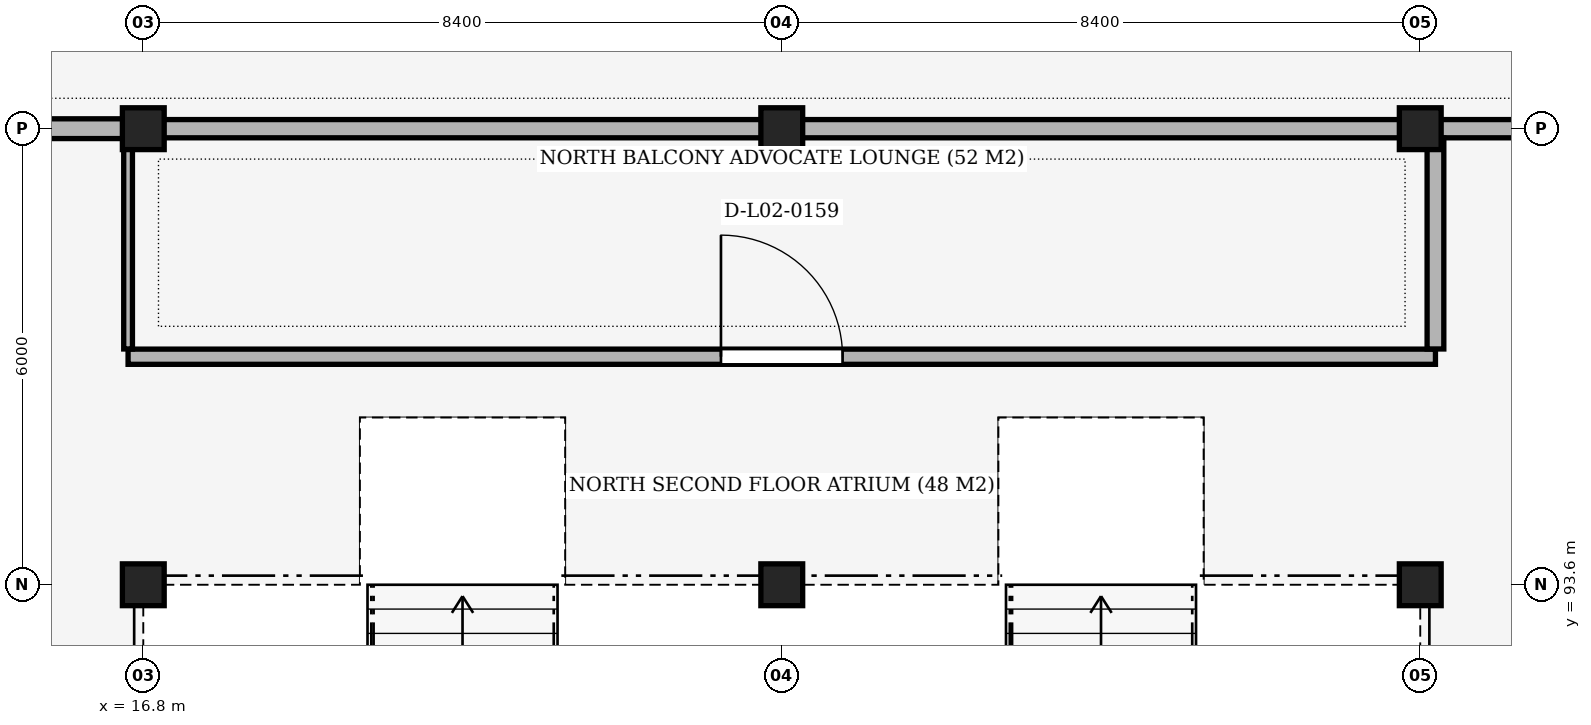
"""IFC4 building model, lengths in metres.
Left out: names, types, materials, properties, quantities, classifications, styles, units other than length and angle.
Written with IfcOpenShell. Run it as: python <this file> out.ifc"""

import sys

from ifc_helpers import new_model, si_unit, direction, frame, frame_2d, origin, origin_2d, place, context, subcontext, project, spatial, rectangle, extrude, element, fill, save


model = new_model("IFC4")
c1 = context("Model", 3, precision=1e-05, world=origin(), true_north=direction((0.0, 1.0)))
c2 = subcontext(c1, "Body", "Model", "MODEL_VIEW")
j1 = project(units=[si_unit("LENGTHUNIT", "METRE"), si_unit("PLANEANGLEUNIT", "RADIAN")], contexts=[c1])
p1 = place(None, origin())
s1 = spatial("IfcSite", under=j1, at=p1, CompositionType="ELEMENT")
p2 = place(p1, origin())
s2 = spatial("IfcBuilding", under=s1, at=p2, CompositionType="ELEMENT")
p3 = place(p2, frame((0.0, 0.0, 10.2)))
s3 = spatial("IfcBuildingStorey", under=s2, at=p3, CompositionType="ELEMENT", Elevation=10.2)
for number, where, z_axis, x_axis in (
    (1, (16.8, 93.6, 0.0), (0.0, 0.0, 1.0), (1.0, 0.0, 0.0)),
    (2, (16.8, 99.6, 0.0), (0.0, 0.0, 1.0), (1.0, 0.0, 0.0)),
    (3, (25.2, 93.6, 0.0), (0.0, 0.0, 1.0), (1.0, 0.0, 0.0)),
    (4, (25.2, 99.6, 0.0), (0.0, 0.0, 1.0), (1.0, 0.0, 0.0)),
    (5, (33.6, 93.6, 0.0), (0.0, 0.0, 1.0), (1.0, 0.0, 0.0)),
    (6, (33.6, 99.6, 0.0), (0.0, 0.0, 1.0), (1.0, 0.0, 0.0)),
):
    element("IfcColumn", number, at=place(p3, frame(where, z_axis=z_axis, x_axis=x_axis)), inside=s3, PredefinedType="COLUMN", context=c2, shape_type="SweptSolid", body=[
        extrude(rectangle(XDim=0.55, YDim=0.55, at=origin_2d()), origin(), (0.0, 0.0, 1.0), 5.1),
    ])
p4 = place(p3, frame((16.6, 96.6, 0.0), z_axis=(0.0, 0.0, 1.0), x_axis=(1.0, 0.0, 0.0)))
e7 = element("IfcWall", 7, at=p4, inside=s3, PredefinedType="PARTITIONING", context=c2, shape_type="SweptSolid", body=[
    extrude(rectangle(XDim=17.2, YDim=0.2, at=frame_2d((8.6, 0.0))), origin(), (0.0, 0.0, 1.0), 4.27),
])
p5 = place(p4, frame((7.8, 0.0, 0.0)))
e8 = element("IfcOpeningElement", 8, at=p5, cuts=e7, PredefinedType="OPENING", context=c2, shape_type="SweptSolid", body=[
    extrude(rectangle(XDim=1.6, YDim=2.3, at=frame_2d((0.8, 1.15))), frame((0.0, 0.115, 0.0), z_axis=(0.0, -1.0, 0.0), x_axis=(1.0, 0.0, 0.0)), (0.0, 0.0, 1.0), 0.23),
])
p6 = place(p3, frame((13.8, 99.6, 0.0), z_axis=(0.0, 0.0, 1.0), x_axis=(1.0, 0.0, 0.0)))
e9 = element("IfcWall", 9, at=p6, inside=s3, PredefinedType="PARTITIONING", context=c2, shape_type="SweptSolid", body=[
    extrude(rectangle(XDim=2.8, YDim=0.26, at=frame_2d((1.4, 0.0))), origin(), (0.0, 0.0, 1.0), 4.12),
])
p7 = place(p3, frame((33.8, 99.6, 0.0), z_axis=(0.0, 0.0, 1.0), x_axis=(1.0, 0.0, 0.0)))
e10 = element("IfcWall", 10, at=p7, inside=s3, PredefinedType="PARTITIONING", context=c2, shape_type="SweptSolid", body=[
    extrude(rectangle(XDim=2.8, YDim=0.24, at=frame_2d((1.4, 0.0))), origin(), (0.0, 0.0, 1.0), 4.12),
])
p8 = place(p7, frame((1.3, 0.0, 0.0)))
e11 = element("IfcOpeningElement", 11, at=p8, cuts=e10, PredefinedType="OPENING", context=c2, shape_type="SweptSolid", body=[
    extrude(rectangle(XDim=1.1, YDim=2.1, at=frame_2d((0.55, 1.05))), frame((0.0, 0.135, 0.0), z_axis=(0.0, -1.0, 0.0), x_axis=(1.0, 0.0, 0.0)), (0.0, 0.0, 1.0), 0.27),
])
p9 = place(p3, frame((16.6, 99.6, 0.0), z_axis=(0.0, 0.0, 1.0), x_axis=(1.0, 0.0, 0.0)))
e12 = element("IfcWall", 12, at=p9, inside=s3, PredefinedType="PARTITIONING", context=c2, shape_type="SweptSolid", body=[
    extrude(rectangle(XDim=17.2, YDim=0.24, at=frame_2d((8.6, 0.0))), origin(), (0.0, 0.0, 1.0), 4.12),
])
p10 = place(p3, frame((16.6, 96.702, 0.0), z_axis=(0.0, 0.0, 1.0), x_axis=(0.0, 1.0, 0.0)))
e13 = element("IfcWall", 13, at=p10, inside=s3, PredefinedType="PARTITIONING", context=c2, shape_type="SweptSolid", body=[
    extrude(rectangle(XDim=2.766, YDim=0.115, at=frame_2d((1.383, 0.0))), origin(), (0.0, 0.0, 1.0), 4.12),
])
p11 = place(p3, frame((33.8, 96.702, 0.0), z_axis=(0.0, 0.0, 1.0), x_axis=(0.0, 1.0, 0.0)))
e14 = element("IfcWall", 14, at=p11, inside=s3, PredefinedType="PARTITIONING", context=c2, shape_type="SweptSolid", body=[
    extrude(rectangle(XDim=2.776, YDim=0.22, at=frame_2d((1.388, 0.0))), origin(), (0.0, 0.0, 1.0), 4.12),
])
p12 = place(p5, origin())
e15 = element("IfcDoor", 15, at=p12, inside=s3, OperationType="SINGLE_SWING_LEFT", PredefinedType="DOOR", context=c2, shape_type="SweptSolid", body=[
    extrude(rectangle(XDim=1.6, YDim=2.3, at=frame_2d((0.8, 1.15))), frame((0.0, 0.025, 0.0), z_axis=(0.0, -1.0, 0.0), x_axis=(1.0, 0.0, 0.0)), (0.0, 0.0, 1.0), 0.05),
])
fill(e8, e15)
save(model, sys.argv[1])
